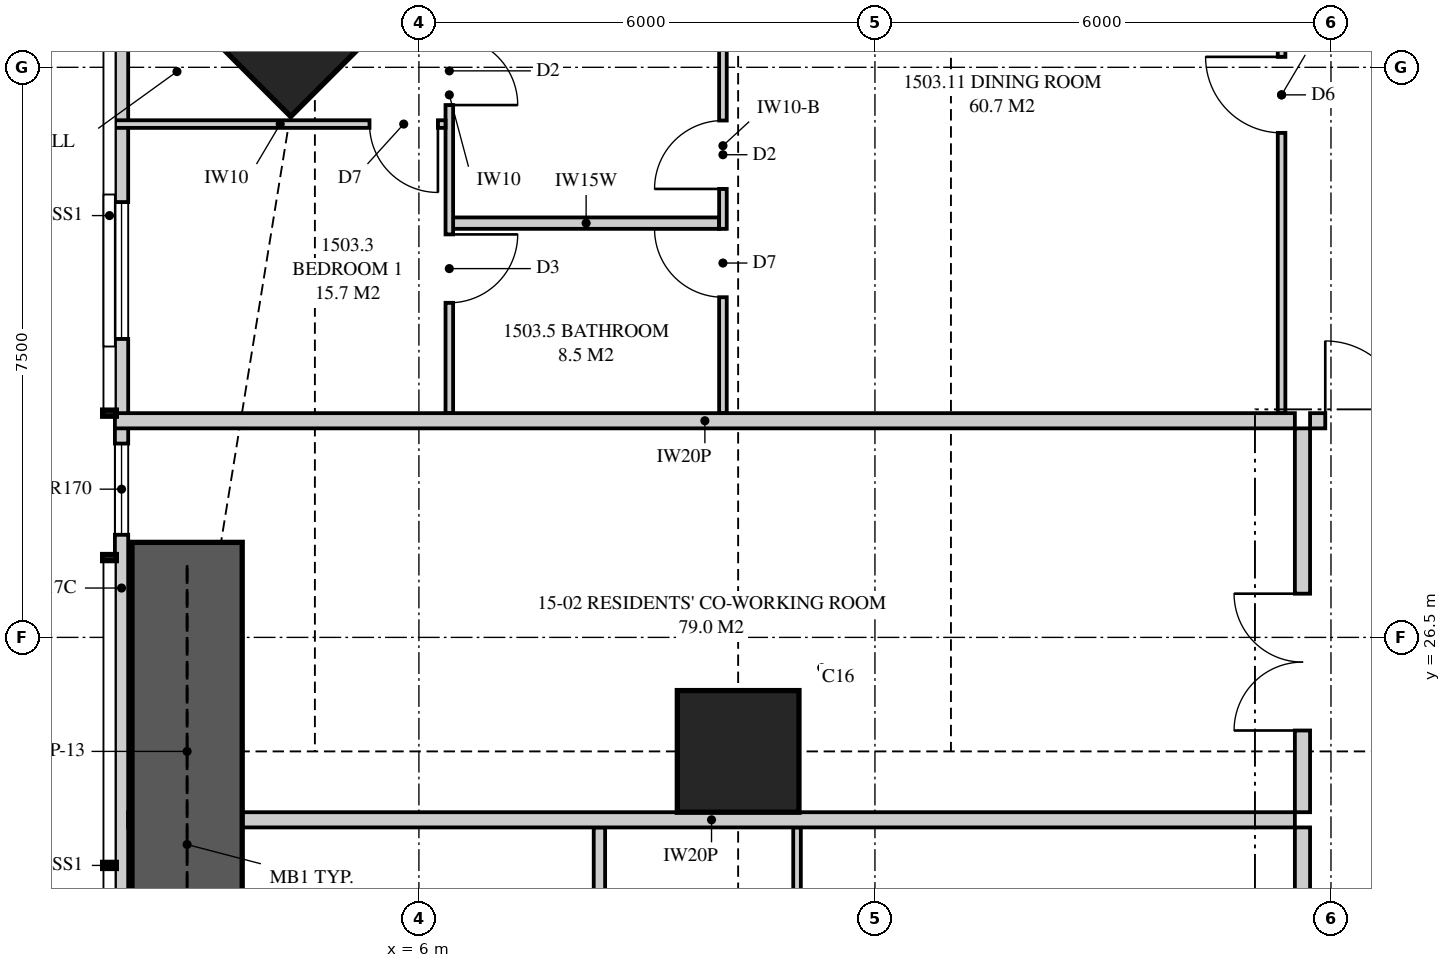
"""IFC4 building model, lengths in metres.
Left out: names, types, materials, properties, quantities, classifications, styles, units other than length and angle.
Written with IfcOpenShell. Run it as: python <this file> out.ifc"""

import sys

from ifc_helpers import new_model, si_unit, direction, frame, frame_2d, origin, origin_2d, place, context, subcontext, project, spatial, polyline, rectangle, outline, extrude, element, fill, save


model = new_model("IFC4")
c1 = context("Model", 3, precision=1e-05, world=origin(), true_north=direction((0.0, 1.0)))
c2 = subcontext(c1, "Body", "Model", "MODEL_VIEW")
j1 = project(units=[si_unit("LENGTHUNIT", "METRE"), si_unit("PLANEANGLEUNIT", "RADIAN")], contexts=[c1])
p1 = place(None, origin())
s1 = spatial("IfcSite", under=j1, at=p1, CompositionType="ELEMENT")
p2 = place(p1, origin())
s2 = spatial("IfcBuilding", under=s1, at=p2, CompositionType="ELEMENT")
p3 = place(p2, frame((0.0, 0.0, 57.85)))
s3 = spatial("IfcBuildingStorey", under=s2, at=p3, CompositionType="ELEMENT", Elevation=57.85)
p4 = place(p3, frame((4.631, 35.369, 0.0), z_axis=(0.0, 0.0, 1.0), x_axis=(0.707106781187, -0.707106781187, 0.0)))
e1 = element("IfcColumn", 1, at=p4, inside=s3, PredefinedType="COLUMN", context=c2, shape_type="SweptSolid", body=[
    extrude(rectangle(XDim=2.4, YDim=3.3, at=origin_2d()), origin(), (0.0, 0.0, 1.0), 3.35),
])
p5 = place(p3, frame((10.2, 25.0, 0.0), z_axis=(0.0, 0.0, 1.0), x_axis=(1.0, 0.0, 0.0)))
e2 = element("IfcColumn", 2, at=p5, inside=s3, PredefinedType="COLUMN", context=c2, shape_type="SweptSolid", body=[
    extrude(rectangle(XDim=1.6, YDim=1.6, at=origin_2d()), origin(), (0.0, 0.0, 1.0), 3.35),
])
p6 = place(p3, frame((2.087, 34.949, 0.0), z_axis=(0.0, 0.0, 1.0), x_axis=(0.0, -1.0, 0.0)))
e3 = element("IfcWall", 3, at=p6, inside=s3, PredefinedType="SOLIDWALL", context=c2, shape_type="SweptSolid", body=[
    extrude(outline(polyline([(0.0, 0.0), (15.599, 0.0), (15.599, 2.15), (9.949, 2.15), (9.949, 3.11), (9.823, 3.11), (9.823, 2.15), (9.73, 2.15), (9.73, 3.11), (0.0, 3.11), (0.0, 0.0)])), frame((0.0, 0.087, 0.0), z_axis=(0.0, -1.0, 0.0), x_axis=(1.0, 0.0, 0.0)), (0.0, 0.0, 1.0), 0.175),
])
p7 = place(p6, frame((2.722, 0.0, 0.4)))
e4 = element("IfcOpeningElement", 4, at=p7, cuts=e3, PredefinedType="OPENING", context=c2, shape_type="SweptSolid", body=[
    extrude(rectangle(XDim=1.8, YDim=1.7, at=frame_2d((0.9, 0.85))), frame((0.0, 0.097, 0.0), z_axis=(0.0, -1.0, 0.0), x_axis=(1.0, 0.0, 0.0)), (0.0, 0.0, 1.0), 0.195),
])
p8 = place(p6, frame((5.899, 0.0, 0.4)))
e5 = element("IfcOpeningElement", 5, at=p8, cuts=e3, PredefinedType="OPENING", context=c2, shape_type="SweptSolid", body=[
    extrude(rectangle(XDim=1.2, YDim=1.7, at=frame_2d((0.6, 0.85))), frame((0.0, 0.097, 0.0), z_axis=(0.0, -1.0, 0.0), x_axis=(1.0, 0.0, 0.0)), (0.0, 0.0, 1.0), 0.195),
])
p9 = place(p6, frame((12.824, 0.0, 0.4)))
e6 = element("IfcOpeningElement", 6, at=p9, cuts=e3, PredefinedType="OPENING", context=c2, shape_type="SweptSolid", body=[
    extrude(rectangle(XDim=1.8, YDim=1.7, at=frame_2d((0.9, 0.85))), frame((0.0, 0.097, 0.0), z_axis=(0.0, -1.0, 0.0), x_axis=(1.0, 0.0, 0.0)), (0.0, 0.0, 1.0), 0.195),
])
p10 = place(p3, frame((17.725, 29.35, 0.0), z_axis=(0.0, 0.0, 1.0), x_axis=(1.0, 0.0, 0.0)))
e7 = element("IfcWall", 7, at=p10, inside=s3, PredefinedType="PARTITIONING", context=c2, shape_type="SweptSolid", body=[
    extrude(outline(polyline([(0.0, 0.0), (15.275, 0.0), (15.275, 3.11), (6.612, 3.11), (6.612, 2.541), (5.938, 2.541), (5.938, 3.11), (0.0, 3.11), (0.0, 0.0)])), frame((0.0, 0.1, 0.0), z_axis=(0.0, -1.0, 0.0), x_axis=(1.0, 0.0, 0.0)), (0.0, 0.0, 1.0), 0.2),
])
p11 = place(p10, frame((0.2, 0.0, 0.0)))
e8 = element("IfcOpeningElement", 8, at=p11, cuts=e7, PredefinedType="OPENING", context=c2, shape_type="SweptSolid", body=[
    extrude(rectangle(XDim=1.05, YDim=2.2, at=frame_2d((0.525, 1.1))), frame((0.0, 0.11, 0.0), z_axis=(0.0, -1.0, 0.0), x_axis=(1.0, 0.0, 0.0)), (0.0, 0.0, 1.0), 0.22),
])
p12 = place(p3, frame((6.4, 37.825, 0.0), z_axis=(0.0, 0.0, 1.0), x_axis=(0.0, -1.0, 0.0)))
e9 = element("IfcWall", 9, at=p12, inside=s3, PredefinedType="PARTITIONING", context=c2, shape_type="SweptSolid", body=[
    extrude(outline(polyline([(0.0, 0.0), (8.375, 0.0), (8.375, 3.11), (2.978, 3.11), (2.978, 2.15), (1.224, 2.15), (1.224, 3.11), (0.0, 3.11), (0.0, 0.0)])), frame((0.0, 0.05, 0.0), z_axis=(0.0, -1.0, 0.0), x_axis=(1.0, 0.0, 0.0)), (0.0, 0.0, 1.0), 0.1),
])
p13 = place(p12, frame((3.422, 0.0, 0.0)))
e10 = element("IfcOpeningElement", 10, at=p13, cuts=e9, PredefinedType="OPENING", context=c2, shape_type="SweptSolid", body=[
    extrude(rectangle(XDim=0.9, YDim=2.1, at=frame_2d((0.45, 1.05))), frame((0.0, 0.06, 0.0), z_axis=(0.0, -1.0, 0.0), x_axis=(1.0, 0.0, 0.0)), (0.0, 0.0, 1.0), 0.12),
])
p14 = place(p12, frame((6.023, 0.0, 0.0)))
e11 = element("IfcOpeningElement", 11, at=p14, cuts=e9, PredefinedType="OPENING", context=c2, shape_type="SweptSolid", body=[
    extrude(rectangle(XDim=0.9, YDim=2.1, at=frame_2d((0.45, 1.05))), frame((0.0, 0.06, 0.0), z_axis=(0.0, -1.0, 0.0), x_axis=(1.0, 0.0, 0.0)), (0.0, 0.0, 1.0), 0.12),
])
p15 = place(p3, frame((10.0, 36.487, 0.0), z_axis=(0.0, 0.0, 1.0), x_axis=(0.0, -1.0, 0.0)))
e12 = element("IfcWall", 12, at=p15, inside=s3, PredefinedType="PARTITIONING", context=c2, shape_type="SweptSolid", body=[
    extrude(outline(polyline([(0.0, 0.0), (7.037, 0.0), (7.037, 2.51), (0.917, 2.51), (0.917, 2.15), (0.0, 2.15), (0.0, 0.0)])), frame((0.0, 0.05, 0.0), z_axis=(0.0, -1.0, 0.0), x_axis=(1.0, 0.0, 0.0)), (0.0, 0.0, 1.0), 0.1),
])
p16 = place(p15, frame((3.188, 0.0, 0.0)))
e13 = element("IfcOpeningElement", 13, at=p16, cuts=e12, PredefinedType="OPENING", context=c2, shape_type="SweptSolid", body=[
    extrude(rectangle(XDim=0.9, YDim=2.1, at=frame_2d((0.45, 1.05))), frame((0.0, 0.06, 0.0), z_axis=(0.0, -1.0, 0.0), x_axis=(1.0, 0.0, 0.0)), (0.0, 0.0, 1.0), 0.12),
])
p17 = place(p15, frame((4.612, 0.0, 0.0)))
e14 = element("IfcOpeningElement", 14, at=p17, cuts=e12, PredefinedType="OPENING", context=c2, shape_type="SweptSolid", body=[
    extrude(rectangle(XDim=0.9, YDim=2.1, at=frame_2d((0.45, 1.05))), frame((0.0, 0.06, 0.0), z_axis=(0.0, -1.0, 0.0), x_axis=(1.0, 0.0, 0.0)), (0.0, 0.0, 1.0), 0.12),
])
p18 = place(p3, frame((2.0, 33.253, 0.0), z_axis=(0.0, 0.0, 1.0), x_axis=(1.0, 0.0, 0.0)))
e15 = element("IfcWall", 15, at=p18, inside=s3, PredefinedType="PARTITIONING", context=c2, shape_type="SweptSolid", body=[
    extrude(outline(polyline([(0.0, 0.0), (4.35, 0.0), (4.35, 3.11), (3.16, 3.11), (3.16, 2.15), (1.417, 2.15), (1.417, 3.11), (0.0, 3.11), (0.0, 0.0)])), frame((0.0, 0.05, 0.0), z_axis=(0.0, -1.0, 0.0), x_axis=(1.0, 0.0, 0.0)), (0.0, 0.0, 1.0), 0.1),
])
p19 = place(p18, frame((3.35, 0.0, 0.0)))
e16 = element("IfcOpeningElement", 16, at=p19, cuts=e15, PredefinedType="OPENING", context=c2, shape_type="SweptSolid", body=[
    extrude(rectangle(XDim=0.9, YDim=2.1, at=frame_2d((0.45, 1.05))), frame((0.0, 0.06, 0.0), z_axis=(0.0, -1.0, 0.0), x_axis=(1.0, 0.0, 0.0)), (0.0, 0.0, 1.0), 0.12),
])
p20 = place(p3, frame((6.45, 31.95, 0.0), z_axis=(0.0, 0.0, 1.0), x_axis=(1.0, 0.0, 0.0)))
e17 = element("IfcWall", 17, at=p20, inside=s3, PredefinedType="PLUMBINGWALL", context=c2, shape_type="SweptSolid", body=[
    extrude(outline(polyline([(0.0, 0.0), (3.5, 0.0), (3.5, 3.11), (3.5, 2.51), (2.465, 2.51), (2.465, 3.11), (0.0, 3.11), (0.0, 0.0)])), frame((0.0, 0.075, 0.0), z_axis=(0.0, -1.0, 0.0), x_axis=(1.0, 0.0, 0.0)), (0.0, 0.0, 1.0), 0.15),
])
p21 = place(p3, frame((17.35, 37.825, 0.0), z_axis=(0.0, 0.0, 1.0), x_axis=(0.0, -1.0, 0.0)))
e18 = element("IfcWall", 18, at=p21, inside=s3, PredefinedType="PARTITIONING", context=c2, shape_type="SweptSolid", body=[
    extrude(outline(polyline([(0.0, 0.0), (8.375, 0.0), (8.375, 3.11), (1.635, 3.11), (1.635, 2.15), (0.0, 2.15), (0.0, 3.11), (0.0, 0.0)])), frame((0.0, 0.05, 0.0), z_axis=(0.0, -1.0, 0.0), x_axis=(1.0, 0.0, 0.0)), (0.0, 0.0, 1.0), 0.1),
])
p22 = place(p21, frame((3.688, 0.0, 0.0)))
e19 = element("IfcOpeningElement", 19, at=p22, cuts=e18, PredefinedType="OPENING", context=c2, shape_type="SweptSolid", body=[
    extrude(rectangle(XDim=1.0, YDim=2.1, at=frame_2d((0.5, 1.05))), frame((0.0, 0.06, 0.0), z_axis=(0.0, -1.0, 0.0), x_axis=(1.0, 0.0, 0.0)), (0.0, 0.0, 1.0), 0.12),
])
p23 = place(p3, frame((2.0, 29.35, 0.0), z_axis=(0.0, 0.0, 1.0), x_axis=(1.0, 0.0, 0.0)))
e20 = element("IfcWall", 20, at=p23, inside=s3, PredefinedType="PARTITIONING", context=c2, shape_type="SweptSolid", body=[
    extrude(outline(polyline([(0.0, 0.0), (15.525, 0.0), (15.525, 3.11), (11.337, 3.11), (11.337, 2.541), (10.663, 2.541), (10.663, 3.11), (9.51, 3.11), (9.51, 2.51), (6.89, 2.51), (6.89, 3.11), (2.969, 3.11), (2.969, 2.541), (2.577, 2.541), (2.577, 2.15), (0.733, 2.15), (0.733, 3.11), (0.0, 3.11), (0.0, 0.0)])), frame((0.0, 0.1, 0.0), z_axis=(0.0, -1.0, 0.0), x_axis=(1.0, 0.0, 0.0)), (0.0, 0.0, 1.0), 0.2),
])
p24 = place(p3, frame((2.175, 24.1, 0.0), z_axis=(0.0, 0.0, 1.0), x_axis=(1.0, 0.0, 0.0)))
e21 = element("IfcWall", 21, at=p24, inside=s3, PredefinedType="PARTITIONING", context=c2, shape_type="SweptSolid", body=[
    extrude(outline(polyline([(0.529, 2.15), (0.0, 2.15), (0.0, 0.0), (0.529, 0.0), (0.529, 0.889), (1.021, 0.889), (1.021, 0.0), (15.35, 0.0), (15.35, 3.11), (9.335, 3.11), (9.335, 2.51), (6.715, 2.51), (6.715, 3.11), (1.685, 3.11), (1.685, 2.15), (1.021, 2.15), (1.021, 1.261), (0.529, 1.261), (0.529, 2.15)])), frame((0.0, 0.1, 0.0), z_axis=(0.0, -1.0, 0.0), x_axis=(1.0, 0.0, 0.0)), (0.0, 0.0, 1.0), 0.2),
])
p25 = place(p3, frame((17.625, 7.75, 0.0), z_axis=(0.0, 0.0, 1.0), x_axis=(0.0, 1.0, 0.0)))
e22 = element("IfcWall", 22, at=p25, inside=s3, PredefinedType="PARTITIONING", context=c2, shape_type="SweptSolid", body=[
    extrude(outline(polyline([(0.0, 0.0), (16.25, 0.0), (16.25, 3.11), (5.587, 3.11), (5.587, 2.541), (4.913, 2.541), (4.913, 3.11), (0.0, 3.11), (0.0, 0.0)])), frame((0.0, 0.1, 0.0), z_axis=(0.0, -1.0, 0.0), x_axis=(1.0, 0.0, 0.0)), (0.0, 0.0, 1.0), 0.2),
])
p26 = place(p25, frame((7.075, 0.0, 0.0)))
e23 = element("IfcOpeningElement", 23, at=p26, cuts=e22, PredefinedType="OPENING", context=c2, shape_type="SweptSolid", body=[
    extrude(rectangle(XDim=1.05, YDim=2.2, at=frame_2d((0.525, 1.1))), frame((0.0, 0.11, 0.0), z_axis=(0.0, -1.0, 0.0), x_axis=(1.0, 0.0, 0.0)), (0.0, 0.0, 1.0), 0.22),
])
p27 = place(p3, frame((8.375, 19.45, 0.0), z_axis=(0.0, 0.0, 1.0), x_axis=(0.0, 1.0, 0.0)))
e24 = element("IfcWall", 24, at=p27, inside=s3, PredefinedType="PLUMBINGWALL", context=c2, shape_type="SweptSolid", body=[
    extrude(rectangle(XDim=4.55, YDim=0.15, at=frame_2d((2.275, 0.0))), origin(), (0.0, 0.0, 1.0), 3.11),
])
p28 = place(p27, frame((0.4, 0.0, 0.0)))
e25 = element("IfcOpeningElement", 25, at=p28, cuts=e24, PredefinedType="OPENING", context=c2, shape_type="SweptSolid", body=[
    extrude(rectangle(XDim=0.9, YDim=2.1, at=frame_2d((0.45, 1.05))), frame((0.0, 0.085, 0.0), z_axis=(0.0, -1.0, 0.0), x_axis=(1.0, 0.0, 0.0)), (0.0, 0.0, 1.0), 0.17),
])
p29 = place(p3, frame((10.975, 19.45, 0.0), z_axis=(0.0, 0.0, 1.0), x_axis=(0.0, 1.0, 0.0)))
e26 = element("IfcWall", 26, at=p29, inside=s3, PredefinedType="PARTITIONING", context=c2, shape_type="SweptSolid", body=[
    extrude(outline(polyline([(0.0, 0.0), (4.55, 0.0), (4.55, 3.11), (4.55, 2.51), (0.0, 2.51), (0.0, 3.11), (0.0, 0.0)])), frame((0.0, 0.05, 0.0), z_axis=(0.0, -1.0, 0.0), x_axis=(1.0, 0.0, 0.0)), (0.0, 0.0, 1.0), 0.1),
])
p30 = place(p3, frame((17.625, 24.2, 0.0), z_axis=(0.0, 0.0, 1.0), x_axis=(0.0, 1.0, 0.0)))
e27 = element("IfcWall", 27, at=p30, inside=s3, PredefinedType="PARTITIONING", context=c2, shape_type="SweptSolid", body=[
    extrude(outline(polyline([(0.0, 0.0), (5.05, 0.0), (5.05, 3.11), (1.137, 3.11), (1.137, 2.541), (0.463, 2.541), (0.463, 3.11), (0.0, 3.11), (0.0, 0.0)])), frame((0.0, 0.1, 0.0), z_axis=(0.0, -1.0, 0.0), x_axis=(1.0, 0.0, 0.0)), (0.0, 0.0, 1.0), 0.2),
])
p31 = place(p30, frame((1.075, 0.0, 0.0)))
e28 = element("IfcOpeningElement", 28, at=p31, cuts=e27, PredefinedType="OPENING", context=c2, shape_type="SweptSolid", body=[
    extrude(rectangle(XDim=1.8, YDim=2.1, at=frame_2d((0.9, 1.05))), frame((0.0, 0.11, 0.0), z_axis=(0.0, -1.0, 0.0), x_axis=(1.0, 0.0, 0.0)), (0.0, 0.0, 1.0), 0.22),
])
p32 = place(p3, frame((2.95, 22.25, 0.0), z_axis=(0.0, 0.0, 1.0), x_axis=(0.0, 1.0, 0.0)))
e29 = element("IfcWall", 29, at=p32, inside=s3, PredefinedType="SHEAR", context=c2, shape_type="SweptSolid", body=[
    extrude(rectangle(XDim=5.5, YDim=1.45, at=frame_2d((2.75, 0.0))), origin(), (0.0, 0.0, 1.0), 3.35),
])
p33 = place(p7, origin())
e30 = element("IfcWindow", 30, at=p33, inside=s3, PartitioningType="SINGLE_PANEL", PredefinedType="WINDOW", context=c2, shape_type="SweptSolid", body=[
    extrude(rectangle(XDim=1.8, YDim=1.7, at=frame_2d((0.9, 0.85))), frame((0.0, 0.03, 0.0), z_axis=(0.0, -1.0, 0.0), x_axis=(1.0, 0.0, 0.0)), (0.0, 0.0, 1.0), 0.06),
])
fill(e4, e30)
p34 = place(p8, origin())
e31 = element("IfcWindow", 31, at=p34, inside=s3, PartitioningType="SINGLE_PANEL", PredefinedType="WINDOW", context=c2, shape_type="SweptSolid", body=[
    extrude(rectangle(XDim=1.2, YDim=1.7, at=frame_2d((0.6, 0.85))), frame((0.0, 0.03, 0.0), z_axis=(0.0, -1.0, 0.0), x_axis=(1.0, 0.0, 0.0)), (0.0, 0.0, 1.0), 0.06),
])
fill(e5, e31)
p35 = place(p11, origin())
e32 = element("IfcDoor", 32, at=p35, inside=s3, OperationType="SINGLE_SWING_LEFT", PredefinedType="DOOR", context=c2, shape_type="SweptSolid", body=[
    extrude(rectangle(XDim=1.05, YDim=2.2, at=frame_2d((0.525, 1.1))), frame((0.0, 0.025, 0.0), z_axis=(0.0, -1.0, 0.0), x_axis=(1.0, 0.0, 0.0)), (0.0, 0.0, 1.0), 0.05),
])
fill(e8, e32)
p36 = place(p19, frame((0.9, 0.0, 0.0), z_axis=(0.0, 0.0, 1.0), x_axis=(-1.0, 0.0, 0.0)))
e33 = element("IfcDoor", 33, at=p36, inside=s3, OperationType="SINGLE_SWING_LEFT", PredefinedType="DOOR", context=c2, shape_type="SweptSolid", body=[
    extrude(rectangle(XDim=0.9, YDim=2.1, at=frame_2d((0.45, 1.05))), frame((0.0, 0.025, 0.0), z_axis=(0.0, -1.0, 0.0), x_axis=(1.0, 0.0, 0.0)), (0.0, 0.0, 1.0), 0.05),
])
fill(e16, e33)
p37 = place(p13, origin())
e34 = element("IfcDoor", 34, at=p37, inside=s3, OperationType="SINGLE_SWING_RIGHT", PredefinedType="DOOR", context=c2, shape_type="SweptSolid", body=[
    extrude(rectangle(XDim=0.9, YDim=2.1, at=frame_2d((0.45, 1.05))), frame((0.0, 0.025, 0.0), z_axis=(0.0, -1.0, 0.0), x_axis=(1.0, 0.0, 0.0)), (0.0, 0.0, 1.0), 0.05),
])
fill(e10, e34)
p38 = place(p16, frame((0.9, 0.0, 0.0), z_axis=(0.0, 0.0, 1.0), x_axis=(-1.0, 0.0, 0.0)))
e35 = element("IfcDoor", 35, at=p38, inside=s3, OperationType="SINGLE_SWING_LEFT", PredefinedType="DOOR", context=c2, shape_type="SweptSolid", body=[
    extrude(rectangle(XDim=0.9, YDim=2.1, at=frame_2d((0.45, 1.05))), frame((0.0, 0.025, 0.0), z_axis=(0.0, -1.0, 0.0), x_axis=(1.0, 0.0, 0.0)), (0.0, 0.0, 1.0), 0.05),
])
fill(e13, e35)
p39 = place(p17, frame((0.9, 0.0, 0.0), z_axis=(0.0, 0.0, 1.0), x_axis=(-1.0, 0.0, 0.0)))
e36 = element("IfcDoor", 36, at=p39, inside=s3, OperationType="SINGLE_SWING_RIGHT", PredefinedType="DOOR", context=c2, shape_type="SweptSolid", body=[
    extrude(rectangle(XDim=0.9, YDim=2.1, at=frame_2d((0.45, 1.05))), frame((0.0, 0.025, 0.0), z_axis=(0.0, -1.0, 0.0), x_axis=(1.0, 0.0, 0.0)), (0.0, 0.0, 1.0), 0.05),
])
fill(e14, e36)
p40 = place(p14, origin())
e37 = element("IfcDoor", 37, at=p40, inside=s3, OperationType="SINGLE_SWING_LEFT", PredefinedType="DOOR", context=c2, shape_type="SweptSolid", body=[
    extrude(rectangle(XDim=0.9, YDim=2.1, at=frame_2d((0.45, 1.05))), frame((0.0, 0.025, 0.0), z_axis=(0.0, -1.0, 0.0), x_axis=(1.0, 0.0, 0.0)), (0.0, 0.0, 1.0), 0.05),
])
fill(e11, e37)
p41 = place(p22, frame((1.0, 0.0, 0.0), z_axis=(0.0, 0.0, 1.0), x_axis=(-1.0, 0.0, 0.0)))
e38 = element("IfcDoor", 38, at=p41, inside=s3, OperationType="SINGLE_SWING_RIGHT", PredefinedType="DOOR", context=c2, shape_type="SweptSolid", body=[
    extrude(rectangle(XDim=1.0, YDim=2.1, at=frame_2d((0.5, 1.05))), frame((0.0, 0.025, 0.0), z_axis=(0.0, -1.0, 0.0), x_axis=(1.0, 0.0, 0.0)), (0.0, 0.0, 1.0), 0.05),
])
fill(e19, e38)
p42 = place(p31, origin())
e39 = element("IfcDoor", 39, at=p42, inside=s3, OperationType="DOUBLE_DOOR_SINGLE_SWING", PredefinedType="DOOR", context=c2, shape_type="SweptSolid", body=[
    extrude(rectangle(XDim=1.8, YDim=2.1, at=frame_2d((0.9, 1.05))), frame((0.0, 0.025, 0.0), z_axis=(0.0, -1.0, 0.0), x_axis=(1.0, 0.0, 0.0)), (0.0, 0.0, 1.0), 0.05),
])
fill(e28, e39)
save(model, sys.argv[1])
